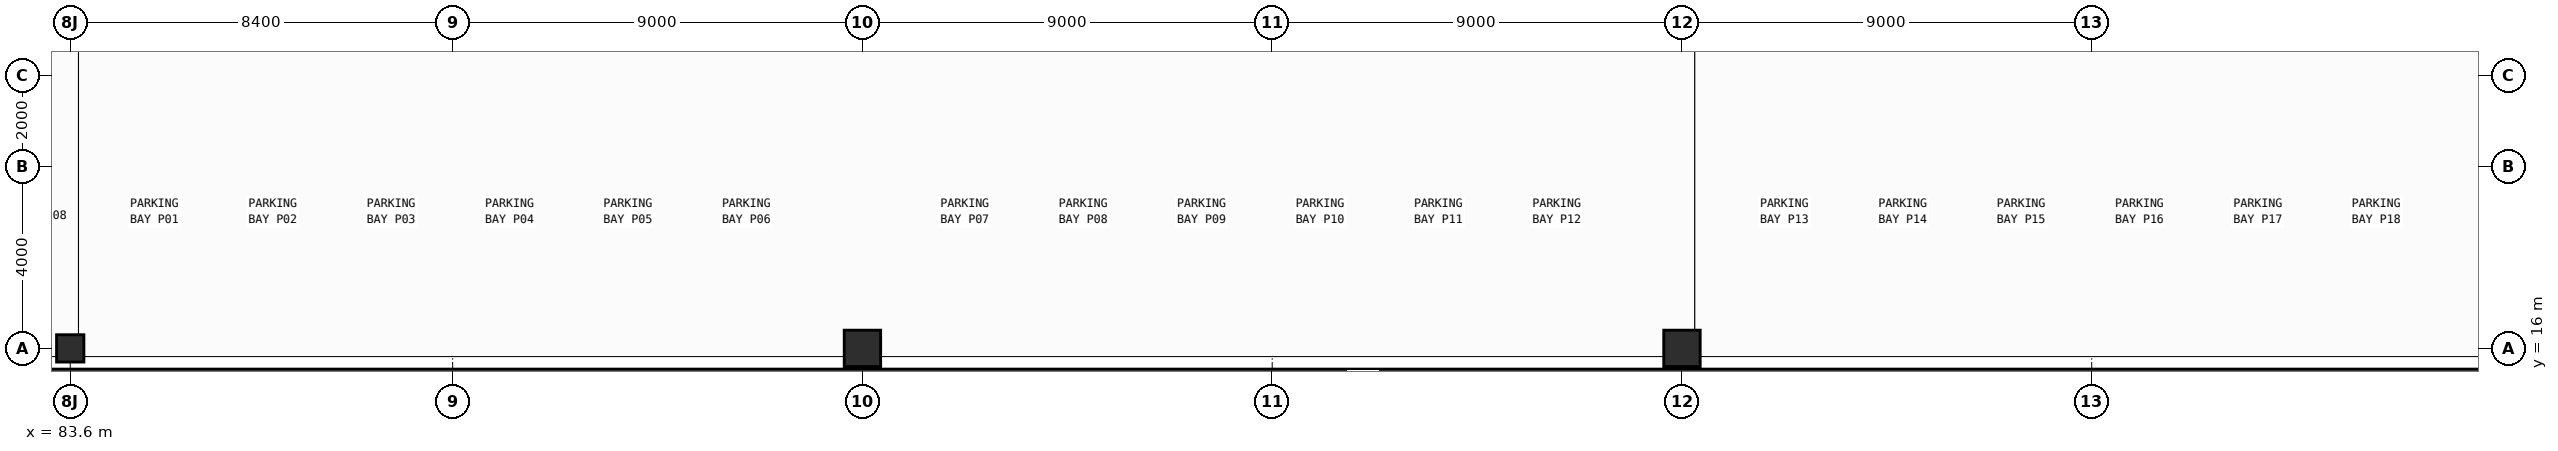
"""IFC4 building model, lengths in metres.
Left out: names, types, materials, properties, quantities, classifications, styles, units other than length and angle.
Written with IfcOpenShell. Run it as: python <this file> out.ifc"""

import sys

from ifc_helpers import new_model, si_unit, direction, frame, frame_2d, origin, origin_2d, place, context, subcontext, project, spatial, rectangle, extrude, element, save


model = new_model("IFC4")
c1 = context("Model", 3, precision=1e-05, world=origin(), true_north=direction((0.0, 1.0)))
c2 = subcontext(c1, "Body", "Model", "MODEL_VIEW")
j1 = project(units=[si_unit("LENGTHUNIT", "METRE"), si_unit("PLANEANGLEUNIT", "RADIAN")], contexts=[c1])
p1 = place(None, origin())
s1 = spatial("IfcSite", under=j1, at=p1, CompositionType="ELEMENT")
p2 = place(p1, origin())
s2 = spatial("IfcBuilding", under=s1, at=p2, CompositionType="ELEMENT")
p3 = place(p2, frame((0.0, 0.0, -5.4)))
s3 = spatial("IfcBuildingStorey", under=s2, at=p3, CompositionType="ELEMENT", Elevation=-5.4)
p4 = place(p3, frame((83.6, 16.0, 0.0), z_axis=(0.0, 0.0, 1.0), x_axis=(1.0, 0.0, 0.0)))
e1 = element("IfcColumn", 1, at=p4, inside=s3, PredefinedType="COLUMN", context=c2, shape_type="SweptSolid", body=[
    extrude(rectangle(XDim=0.6, YDim=0.6, at=origin_2d()), origin(), (0.0, 0.0, 1.0), 5.4),
])
for number, where, z_axis, x_axis in (
    (2, (101.0, 16.0, 0.0), (0.0, 0.0, 1.0), (1.0, 0.0, 0.0)),
    (3, (119.0, 16.0, 0.0), (0.0, 0.0, 1.0), (1.0, 0.0, 0.0)),
):
    element("IfcColumn", number, at=place(p3, frame(where, z_axis=z_axis, x_axis=x_axis)), inside=s3, PredefinedType="COLUMN", context=c2, shape_type="SweptSolid", body=[
        extrude(rectangle(XDim=0.8, YDim=0.8, at=origin_2d()), origin(), (0.0, 0.0, 1.0), 5.4),
    ])
p5 = place(p3, frame((204.845, 15.35, 0.0), z_axis=(0.0, 0.0, 1.0), x_axis=(-1.0, 0.0, 0.0)))
e4 = element("IfcWall", 4, at=p5, inside=s3, PredefinedType="SOLIDWALL", context=c2, shape_type="SweptSolid", body=[
    extrude(rectangle(XDim=185.69, YDim=0.39, at=frame_2d((92.845, 0.0))), origin(), (0.0, 0.0, 1.0), 5.048),
])
save(model, sys.argv[1])
